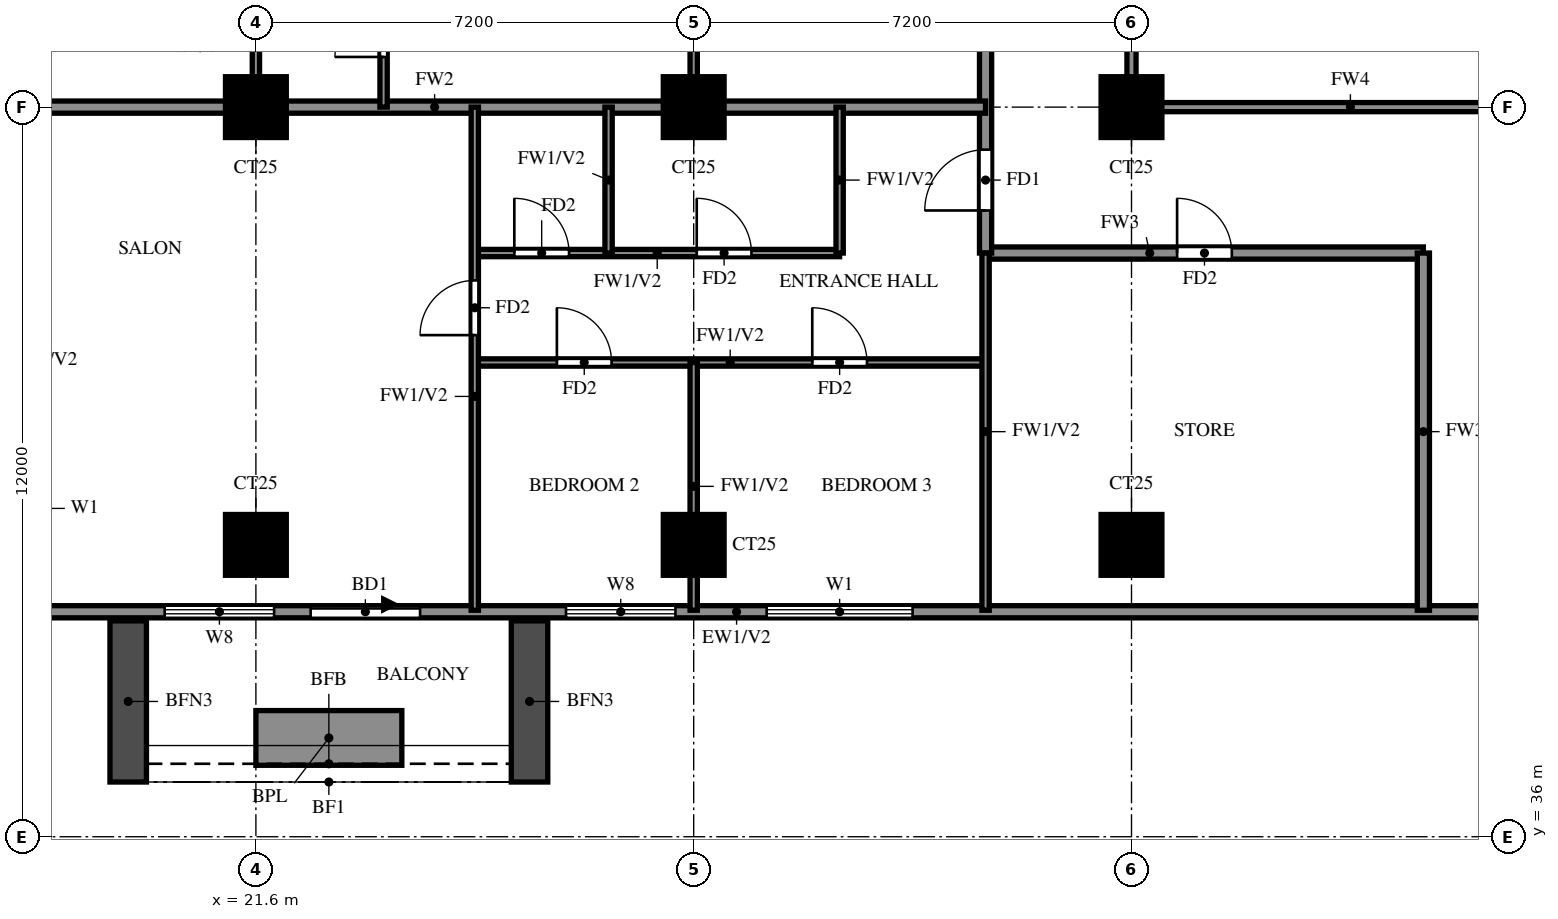
"""IFC4 building model, lengths in metres.
Left out: names, types, materials, properties, quantities, classifications, styles, units other than length and angle.
Written with IfcOpenShell. Run it as: python <this file> out.ifc"""

import sys

from ifc_helpers import new_model, si_unit, direction, frame, frame_2d, origin, origin_2d, place, context, subcontext, project, spatial, rectangle, extrude, source, transform, mapped, element, fill, save


model = new_model("IFC4")
c1 = context("Model", 3, precision=1e-05, world=origin(), true_north=direction((0.0, 1.0)))
c2 = subcontext(c1, "Body", "Model", "MODEL_VIEW")
j1 = project(units=[si_unit("LENGTHUNIT", "METRE"), si_unit("PLANEANGLEUNIT", "RADIAN")], contexts=[c1])
p1 = place(None, origin())
s1 = spatial("IfcSite", under=j1, at=p1, CompositionType="ELEMENT")
p2 = place(p1, origin())
s2 = spatial("IfcBuilding", under=s1, at=p2, CompositionType="ELEMENT")
p3 = place(p2, frame((0.0, 0.0, 171.0)))
s3 = spatial("IfcBuildingStorey", under=s2, at=p3, CompositionType="ELEMENT", Elevation=171.0)
m1 = source(origin(), c2, "Body", "SweptSolid", [
    extrude(rectangle(XDim=1.0, YDim=1.0, at=origin_2d()), origin(), (0.0, 0.0, 1.0), 3.2),
])
for number, where, z_axis, x_axis in (
    (1, (21.6, 40.8, 0.0), (0.0, 0.0, 1.0), (1.0, 0.0, 0.0)),
    (2, (28.8, 40.8, 0.0), (0.0, 0.0, 1.0), (1.0, 0.0, 0.0)),
    (3, (36.0, 40.8, 0.0), (0.0, 0.0, 1.0), (1.0, 0.0, 0.0)),
    (4, (21.6, 48.0, 0.0), (0.0, 0.0, 1.0), (1.0, 0.0, 0.0)),
    (5, (28.8, 48.0, 0.0), (0.0, 0.0, 1.0), (1.0, 0.0, 0.0)),
    (6, (36.0, 48.0, 0.0), (0.0, 0.0, 1.0), (1.0, 0.0, 0.0)),
):
    element("IfcColumn", number, at=place(p3, frame(where, z_axis=z_axis, x_axis=x_axis)), inside=s3, PredefinedType="COLUMN", context=c2, shape_type="MappedRepresentation", body=[
        mapped(m1, transform((0.0, 0.0, 0.0))),
    ])
p4 = place(p3, frame((18.2, 39.7, 0.0), z_axis=(0.0, 0.0, 1.0), x_axis=(1.0, 0.0, 0.0)))
e7 = element("IfcWall", 7, at=p4, inside=s3, PredefinedType="SOLIDWALL", context=c2, shape_type="SweptSolid", body=[
    extrude(rectangle(XDim=23.8, YDim=0.2, at=frame_2d((11.9, 0.0))), origin(), (0.0, 0.0, 1.0), 3.2),
])
p5 = place(p4, frame((4.3, 0.0, 0.0)))
e8 = element("IfcOpeningElement", 8, at=p5, cuts=e7, PredefinedType="OPENING", context=c2, shape_type="SweptSolid", body=[
    extrude(rectangle(XDim=1.8, YDim=2.4, at=frame_2d((0.9, 1.2))), frame((0.0, 0.11, 0.0), z_axis=(0.0, -1.0, 0.0), x_axis=(1.0, 0.0, 0.0)), (0.0, 0.0, 1.0), 0.22),
])
p6 = place(p4, frame((1.9, 0.0, 0.6)))
e9 = element("IfcOpeningElement", 9, at=p6, cuts=e7, PredefinedType="OPENING", context=c2, shape_type="SweptSolid", body=[
    extrude(rectangle(XDim=1.8, YDim=2.4, at=frame_2d((0.9, 1.2))), frame((0.0, 0.11, 0.0), z_axis=(0.0, -1.0, 0.0), x_axis=(1.0, 0.0, 0.0)), (0.0, 0.0, 1.0), 0.22),
])
p7 = place(p4, frame((8.5, 0.0, 0.6)))
e10 = element("IfcOpeningElement", 10, at=p7, cuts=e7, PredefinedType="OPENING", context=c2, shape_type="SweptSolid", body=[
    extrude(rectangle(XDim=1.8, YDim=2.4, at=frame_2d((0.9, 1.2))), frame((0.0, 0.11, 0.0), z_axis=(0.0, -1.0, 0.0), x_axis=(1.0, 0.0, 0.0)), (0.0, 0.0, 1.0), 0.22),
])
p8 = place(p4, frame((11.8, 0.0, 0.6)))
e11 = element("IfcOpeningElement", 11, at=p8, cuts=e7, PredefinedType="OPENING", context=c2, shape_type="SweptSolid", body=[
    extrude(rectangle(XDim=2.4, YDim=2.4, at=frame_2d((1.2, 1.2))), frame((0.0, 0.11, 0.0), z_axis=(0.0, -1.0, 0.0), x_axis=(1.0, 0.0, 0.0)), (0.0, 0.0, 1.0), 0.22),
])
for number, where, z_axis, x_axis in (
    (12, (19.5, 39.55, 0.0), (0.0, 0.0, 1.0), (0.0, -1.0, 0.0)),
    (13, (26.1, 39.55, 0.0), (0.0, 0.0, 1.0), (0.0, -1.0, 0.0)),
):
    element("IfcWall", number, at=place(p3, frame(where, z_axis=z_axis, x_axis=x_axis)), inside=s3, PredefinedType="SOLIDWALL", context=c2, shape_type="SweptSolid", body=[
        extrude(rectangle(XDim=2.65, YDim=0.6, at=frame_2d((1.325, 0.0))), origin(), (0.0, 0.0, 1.0), 2.85),
    ])
p9 = place(p3, frame((21.6, 37.625, 0.0), z_axis=(0.0, 0.0, 1.0), x_axis=(1.0, 0.0, 0.0)))
e14 = element("IfcWall", 14, at=p9, inside=s3, PredefinedType="SOLIDWALL", context=c2, shape_type="SweptSolid", body=[
    extrude(rectangle(XDim=2.4, YDim=0.9, at=frame_2d((1.2, 0.0))), origin(), (0.0, 0.0, 1.0), 0.9),
])
p10 = place(p3, frame((33.6, 45.6, 0.0), z_axis=(0.0, 0.0, 1.0), x_axis=(1.0, 0.0, 0.0)))
e15 = element("IfcWall", 15, at=p10, inside=s3, PredefinedType="SOLIDWALL", context=c2, shape_type="SweptSolid", body=[
    extrude(rectangle(XDim=7.2, YDim=0.2, at=frame_2d((3.6, 0.0))), origin(), (0.0, 0.0, 1.0), 3.2),
])
p11 = place(p10, frame((3.15, 0.0, 0.0)))
e16 = element("IfcOpeningElement", 16, at=p11, cuts=e15, PredefinedType="OPENING", context=c2, shape_type="SweptSolid", body=[
    extrude(rectangle(XDim=0.9, YDim=2.1, at=frame_2d((0.45, 1.05))), frame((0.0, 0.11, 0.0), z_axis=(0.0, -1.0, 0.0), x_axis=(1.0, 0.0, 0.0)), (0.0, 0.0, 1.0), 0.22),
])
p12 = place(p3, frame((33.6, 45.6, 0.0), z_axis=(0.0, 0.0, 1.0), x_axis=(0.0, 1.0, 0.0)))
e17 = element("IfcWall", 17, at=p12, inside=s3, PredefinedType="SOLIDWALL", context=c2, shape_type="SweptSolid", body=[
    extrude(rectangle(XDim=10.8, YDim=0.2, at=frame_2d((5.4, 0.0))), origin(), (0.0, 0.0, 1.0), 3.2),
])
p13 = place(p12, frame((0.7, 0.0, 0.0)))
e18 = element("IfcOpeningElement", 18, at=p13, cuts=e17, PredefinedType="OPENING", context=c2, shape_type="SweptSolid", body=[
    extrude(rectangle(XDim=1.0, YDim=2.1, at=frame_2d((0.5, 1.05))), frame((0.0, 0.11, 0.0), z_axis=(0.0, -1.0, 0.0), x_axis=(1.0, 0.0, 0.0)), (0.0, 0.0, 1.0), 0.22),
])
p14 = place(p12, frame((9.1, 0.0, 0.0)))
e19 = element("IfcOpeningElement", 19, at=p14, cuts=e17, PredefinedType="OPENING", context=c2, shape_type="SweptSolid", body=[
    extrude(rectangle(XDim=1.0, YDim=2.1, at=frame_2d((0.5, 1.05))), frame((0.0, 0.11, 0.0), z_axis=(0.0, -1.0, 0.0), x_axis=(1.0, 0.0, 0.0)), (0.0, 0.0, 1.0), 0.22),
])
p15 = place(p3, frame((40.8, 39.725, 0.0), z_axis=(0.0, 0.0, 1.0), x_axis=(0.0, 1.0, 0.0)))
e20 = element("IfcWall", 20, at=p15, inside=s3, PredefinedType="SOLIDWALL", context=c2, shape_type="SweptSolid", body=[
    extrude(rectangle(XDim=5.875, YDim=0.2, at=frame_2d((2.938, 0.0))), origin(), (0.0, 0.0, 1.0), 3.2),
])
p16 = place(p3, frame((14.525, 48.0, 0.0), z_axis=(0.0, 0.0, 1.0), x_axis=(1.0, 0.0, 0.0)))
e21 = element("IfcWall", 21, at=p16, inside=s3, PredefinedType="SOLIDWALL", context=c2, shape_type="SweptSolid", body=[
    extrude(rectangle(XDim=19.075, YDim=0.2, at=frame_2d((9.538, 0.0))), origin(), (0.0, 0.0, 1.0), 3.2),
])
p17 = place(p3, frame((25.2, 43.8, 0.0), z_axis=(0.0, 0.0, 1.0), x_axis=(1.0, 0.0, 0.0)))
e22 = element("IfcWall", 22, at=p17, inside=s3, PredefinedType="PARTITIONING", context=c2, shape_type="SweptSolid", body=[
    extrude(rectangle(XDim=8.4, YDim=0.12, at=frame_2d((4.2, 0.0))), origin(), (0.0, 0.0, 1.0), 3.2),
])
p18 = place(p17, frame((1.35, 0.0, 0.0)))
e23 = element("IfcOpeningElement", 23, at=p18, cuts=e22, PredefinedType="OPENING", context=c2, shape_type="SweptSolid", body=[
    extrude(rectangle(XDim=0.9, YDim=2.1, at=frame_2d((0.45, 1.05))), frame((0.0, 0.07, 0.0), z_axis=(0.0, -1.0, 0.0), x_axis=(1.0, 0.0, 0.0)), (0.0, 0.0, 1.0), 0.14),
])
p19 = place(p17, frame((5.55, 0.0, 0.0)))
e24 = element("IfcOpeningElement", 24, at=p19, cuts=e22, PredefinedType="OPENING", context=c2, shape_type="SweptSolid", body=[
    extrude(rectangle(XDim=0.9, YDim=2.1, at=frame_2d((0.45, 1.05))), frame((0.0, 0.07, 0.0), z_axis=(0.0, -1.0, 0.0), x_axis=(1.0, 0.0, 0.0)), (0.0, 0.0, 1.0), 0.14),
])
p20 = place(p3, frame((25.2, 45.6, 0.0), z_axis=(0.0, 0.0, 1.0), x_axis=(1.0, 0.0, 0.0)))
e25 = element("IfcWall", 25, at=p20, inside=s3, PredefinedType="PARTITIONING", context=c2, shape_type="SweptSolid", body=[
    extrude(rectangle(XDim=6.0, YDim=0.12, at=frame_2d((3.0, 0.0))), origin(), (0.0, 0.0, 1.0), 3.2),
])
p21 = place(p20, frame((0.65, 0.0, 0.0)))
e26 = element("IfcOpeningElement", 26, at=p21, cuts=e25, PredefinedType="OPENING", context=c2, shape_type="SweptSolid", body=[
    extrude(rectangle(XDim=0.9, YDim=2.1, at=frame_2d((0.45, 1.05))), frame((0.0, 0.07, 0.0), z_axis=(0.0, -1.0, 0.0), x_axis=(1.0, 0.0, 0.0)), (0.0, 0.0, 1.0), 0.14),
])
p22 = place(p20, frame((3.65, 0.0, 0.0)))
e27 = element("IfcOpeningElement", 27, at=p22, cuts=e25, PredefinedType="OPENING", context=c2, shape_type="SweptSolid", body=[
    extrude(rectangle(XDim=0.9, YDim=2.1, at=frame_2d((0.45, 1.05))), frame((0.0, 0.07, 0.0), z_axis=(0.0, -1.0, 0.0), x_axis=(1.0, 0.0, 0.0)), (0.0, 0.0, 1.0), 0.14),
])
p23 = place(p3, frame((21.6, 48.0, 0.0), z_axis=(0.0, 0.0, 1.0), x_axis=(0.0, 1.0, 0.0)))
e28 = element("IfcWall", 28, at=p23, inside=s3, PredefinedType="PARTITIONING", context=c2, shape_type="SweptSolid", body=[
    extrude(rectangle(XDim=3.6, YDim=0.12, at=frame_2d((1.8, 0.0))), origin(), (0.0, 0.0, 1.0), 3.2),
])
p24 = place(p23, frame((1.35, 0.0, 0.0)))
e29 = element("IfcOpeningElement", 29, at=p24, cuts=e28, PredefinedType="OPENING", context=c2, shape_type="SweptSolid", body=[
    extrude(rectangle(XDim=0.9, YDim=2.1, at=frame_2d((0.45, 1.05))), frame((0.0, 0.07, 0.0), z_axis=(0.0, -1.0, 0.0), x_axis=(1.0, 0.0, 0.0)), (0.0, 0.0, 1.0), 0.14),
])
p25 = place(p3, frame((23.7, 48.0, 0.0), z_axis=(0.0, 0.0, 1.0), x_axis=(0.0, 1.0, 0.0)))
e30 = element("IfcWall", 30, at=p25, inside=s3, PredefinedType="PARTITIONING", context=c2, shape_type="SweptSolid", body=[
    extrude(rectangle(XDim=6.0, YDim=0.12, at=frame_2d((3.0, 0.0))), origin(), (0.0, 0.0, 1.0), 3.2),
])
p26 = place(p25, frame((0.825, 0.0, 0.0)))
e31 = element("IfcOpeningElement", 31, at=p26, cuts=e30, PredefinedType="OPENING", context=c2, shape_type="SweptSolid", body=[
    extrude(rectangle(XDim=0.8, YDim=2.1, at=frame_2d((0.4, 1.05))), frame((0.0, 0.07, 0.0), z_axis=(0.0, -1.0, 0.0), x_axis=(1.0, 0.0, 0.0)), (0.0, 0.0, 1.0), 0.14),
])
p27 = place(p3, frame((25.2, 39.725, 0.0), z_axis=(0.0, 0.0, 1.0), x_axis=(0.0, 1.0, 0.0)))
e32 = element("IfcWall", 32, at=p27, inside=s3, PredefinedType="PARTITIONING", context=c2, shape_type="SweptSolid", body=[
    extrude(rectangle(XDim=8.275, YDim=0.12, at=frame_2d((4.137, 0.0))), origin(), (0.0, 0.0, 1.0), 3.2),
])
p28 = place(p27, frame((4.525, 0.0, 0.0)))
e33 = element("IfcOpeningElement", 33, at=p28, cuts=e32, PredefinedType="OPENING", context=c2, shape_type="SweptSolid", body=[
    extrude(rectangle(XDim=0.9, YDim=2.1, at=frame_2d((0.45, 1.05))), frame((0.0, 0.07, 0.0), z_axis=(0.0, -1.0, 0.0), x_axis=(1.0, 0.0, 0.0)), (0.0, 0.0, 1.0), 0.14),
])
p29 = place(p3, frame((27.4, 45.6, 0.0), z_axis=(0.0, 0.0, 1.0), x_axis=(0.0, 1.0, 0.0)))
e34 = element("IfcWall", 34, at=p29, inside=s3, PredefinedType="PARTITIONING", context=c2, shape_type="SweptSolid", body=[
    extrude(rectangle(XDim=2.4, YDim=0.12, at=frame_2d((1.2, 0.0))), origin(), (0.0, 0.0, 1.0), 3.2),
])
p30 = place(p3, frame((28.8, 39.725, 0.0), z_axis=(0.0, 0.0, 1.0), x_axis=(0.0, 1.0, 0.0)))
e35 = element("IfcWall", 35, at=p30, inside=s3, PredefinedType="PARTITIONING", context=c2, shape_type="SweptSolid", body=[
    extrude(rectangle(XDim=4.075, YDim=0.12, at=frame_2d((2.038, 0.0))), origin(), (0.0, 0.0, 1.0), 3.2),
])
p31 = place(p3, frame((28.8, 48.0, 0.0), z_axis=(0.0, 0.0, 1.0), x_axis=(0.0, 1.0, 0.0)))
e36 = element("IfcWall", 36, at=p31, inside=s3, PredefinedType="PARTITIONING", context=c2, shape_type="SweptSolid", body=[
    extrude(rectangle(XDim=6.0, YDim=0.12, at=frame_2d((3.0, 0.0))), origin(), (0.0, 0.0, 1.0), 3.2),
])
p32 = place(p3, frame((31.2, 45.6, 0.0), z_axis=(0.0, 0.0, 1.0), x_axis=(0.0, 1.0, 0.0)))
e37 = element("IfcWall", 37, at=p32, inside=s3, PredefinedType="PARTITIONING", context=c2, shape_type="SweptSolid", body=[
    extrude(rectangle(XDim=2.4, YDim=0.12, at=frame_2d((1.2, 0.0))), origin(), (0.0, 0.0, 1.0), 3.2),
])
p33 = place(p3, frame((33.6, 39.725, 0.0), z_axis=(0.0, 0.0, 1.0), x_axis=(0.0, 1.0, 0.0)))
e38 = element("IfcWall", 38, at=p33, inside=s3, PredefinedType="PARTITIONING", context=c2, shape_type="SweptSolid", body=[
    extrude(rectangle(XDim=5.875, YDim=0.12, at=frame_2d((2.938, 0.0))), origin(), (0.0, 0.0, 1.0), 3.2),
])
p34 = place(p3, frame((36.0, 48.0, 0.0), z_axis=(0.0, 0.0, 1.0), x_axis=(1.0, 0.0, 0.0)))
e39 = element("IfcWall", 39, at=p34, inside=s3, PredefinedType="SOLIDWALL", context=c2, shape_type="SweptSolid", body=[
    extrude(rectangle(XDim=7.2, YDim=0.15, at=frame_2d((3.6, 0.0))), origin(), (0.0, 0.0, 1.0), 2.3),
])
p35 = place(p3, frame((36.0, 48.0, 0.0), z_axis=(0.0, 0.0, 1.0), x_axis=(0.0, 1.0, 0.0)))
e40 = element("IfcWall", 40, at=p35, inside=s3, PredefinedType="SOLIDWALL", context=c2, shape_type="SweptSolid", body=[
    extrude(rectangle(XDim=14.4, YDim=0.15, at=frame_2d((7.2, 0.0))), origin(), (0.0, 0.0, 1.0), 2.3),
])
p36 = place(p5, origin())
e41 = element("IfcDoor", 41, at=p36, inside=s3, OperationType="DOUBLE_DOOR_SLIDING", PredefinedType="DOOR", context=c2, shape_type="SweptSolid", body=[
    extrude(rectangle(XDim=1.8, YDim=2.4, at=frame_2d((0.9, 1.2))), frame((0.0, 0.025, 0.0), z_axis=(0.0, -1.0, 0.0), x_axis=(1.0, 0.0, 0.0)), (0.0, 0.0, 1.0), 0.05),
])
fill(e8, e41)
p37 = place(p6, origin())
e42 = element("IfcWindow", 42, at=p37, inside=s3, PartitioningType="DOUBLE_PANEL_VERTICAL", PredefinedType="WINDOW", context=c2, shape_type="SweptSolid", body=[
    extrude(rectangle(XDim=1.8, YDim=2.4, at=frame_2d((0.9, 1.2))), frame((0.0, 0.03, 0.0), z_axis=(0.0, -1.0, 0.0), x_axis=(1.0, 0.0, 0.0)), (0.0, 0.0, 1.0), 0.06),
])
fill(e9, e42)
p38 = place(p7, origin())
e43 = element("IfcWindow", 43, at=p38, inside=s3, PartitioningType="DOUBLE_PANEL_VERTICAL", PredefinedType="WINDOW", context=c2, shape_type="SweptSolid", body=[
    extrude(rectangle(XDim=1.8, YDim=2.4, at=frame_2d((0.9, 1.2))), frame((0.0, 0.03, 0.0), z_axis=(0.0, -1.0, 0.0), x_axis=(1.0, 0.0, 0.0)), (0.0, 0.0, 1.0), 0.06),
])
fill(e10, e43)
p39 = place(p8, origin())
e44 = element("IfcWindow", 44, at=p39, inside=s3, PartitioningType="DOUBLE_PANEL_VERTICAL", PredefinedType="WINDOW", context=c2, shape_type="SweptSolid", body=[
    extrude(rectangle(XDim=2.4, YDim=2.4, at=frame_2d((1.2, 1.2))), frame((0.0, 0.03, 0.0), z_axis=(0.0, -1.0, 0.0), x_axis=(1.0, 0.0, 0.0)), (0.0, 0.0, 1.0), 0.06),
])
fill(e11, e44)
p40 = place(p13, origin())
e45 = element("IfcDoor", 45, at=p40, inside=s3, OperationType="SINGLE_SWING_RIGHT", PredefinedType="DOOR", context=c2, shape_type="SweptSolid", body=[
    extrude(rectangle(XDim=1.0, YDim=2.1, at=frame_2d((0.5, 1.05))), frame((0.0, 0.025, 0.0), z_axis=(0.0, -1.0, 0.0), x_axis=(1.0, 0.0, 0.0)), (0.0, 0.0, 1.0), 0.05),
])
fill(e18, e45)
p41 = place(p28, origin())
e46 = element("IfcDoor", 46, at=p41, inside=s3, OperationType="SINGLE_SWING_LEFT", PredefinedType="DOOR", context=c2, shape_type="SweptSolid", body=[
    extrude(rectangle(XDim=0.9, YDim=2.1, at=frame_2d((0.45, 1.05))), frame((0.0, 0.025, 0.0), z_axis=(0.0, -1.0, 0.0), x_axis=(1.0, 0.0, 0.0)), (0.0, 0.0, 1.0), 0.05),
])
fill(e33, e46)
p42 = place(p18, origin())
e47 = element("IfcDoor", 47, at=p42, inside=s3, OperationType="SINGLE_SWING_LEFT", PredefinedType="DOOR", context=c2, shape_type="SweptSolid", body=[
    extrude(rectangle(XDim=0.9, YDim=2.1, at=frame_2d((0.45, 1.05))), frame((0.0, 0.025, 0.0), z_axis=(0.0, -1.0, 0.0), x_axis=(1.0, 0.0, 0.0)), (0.0, 0.0, 1.0), 0.05),
])
fill(e23, e47)
p43 = place(p19, origin())
e48 = element("IfcDoor", 48, at=p43, inside=s3, OperationType="SINGLE_SWING_RIGHT", PredefinedType="DOOR", context=c2, shape_type="SweptSolid", body=[
    extrude(rectangle(XDim=0.9, YDim=2.1, at=frame_2d((0.45, 1.05))), frame((0.0, 0.025, 0.0), z_axis=(0.0, -1.0, 0.0), x_axis=(1.0, 0.0, 0.0)), (0.0, 0.0, 1.0), 0.05),
])
fill(e24, e48)
p44 = place(p21, origin())
e49 = element("IfcDoor", 49, at=p44, inside=s3, OperationType="SINGLE_SWING_LEFT", PredefinedType="DOOR", context=c2, shape_type="SweptSolid", body=[
    extrude(rectangle(XDim=0.9, YDim=2.1, at=frame_2d((0.45, 1.05))), frame((0.0, 0.025, 0.0), z_axis=(0.0, -1.0, 0.0), x_axis=(1.0, 0.0, 0.0)), (0.0, 0.0, 1.0), 0.05),
])
fill(e26, e49)
p45 = place(p22, origin())
e50 = element("IfcDoor", 50, at=p45, inside=s3, OperationType="SINGLE_SWING_LEFT", PredefinedType="DOOR", context=c2, shape_type="SweptSolid", body=[
    extrude(rectangle(XDim=0.9, YDim=2.1, at=frame_2d((0.45, 1.05))), frame((0.0, 0.025, 0.0), z_axis=(0.0, -1.0, 0.0), x_axis=(1.0, 0.0, 0.0)), (0.0, 0.0, 1.0), 0.05),
])
fill(e27, e50)
p46 = place(p11, origin())
e51 = element("IfcDoor", 51, at=p46, inside=s3, OperationType="SINGLE_SWING_RIGHT", PredefinedType="DOOR", context=c2, shape_type="SweptSolid", body=[
    extrude(rectangle(XDim=0.9, YDim=2.1, at=frame_2d((0.45, 1.05))), frame((0.0, 0.025, 0.0), z_axis=(0.0, -1.0, 0.0), x_axis=(1.0, 0.0, 0.0)), (0.0, 0.0, 1.0), 0.05),
])
fill(e16, e51)
p47 = place(p26, origin())
e52 = element("IfcDoor", 52, at=p47, inside=s3, OperationType="SINGLE_SWING_LEFT", PredefinedType="DOOR", context=c2, shape_type="SweptSolid", body=[
    extrude(rectangle(XDim=0.8, YDim=2.1, at=frame_2d((0.4, 1.05))), frame((0.0, 0.025, 0.0), z_axis=(0.0, -1.0, 0.0), x_axis=(1.0, 0.0, 0.0)), (0.0, 0.0, 1.0), 0.05),
])
fill(e31, e52)
save(model, sys.argv[1])
